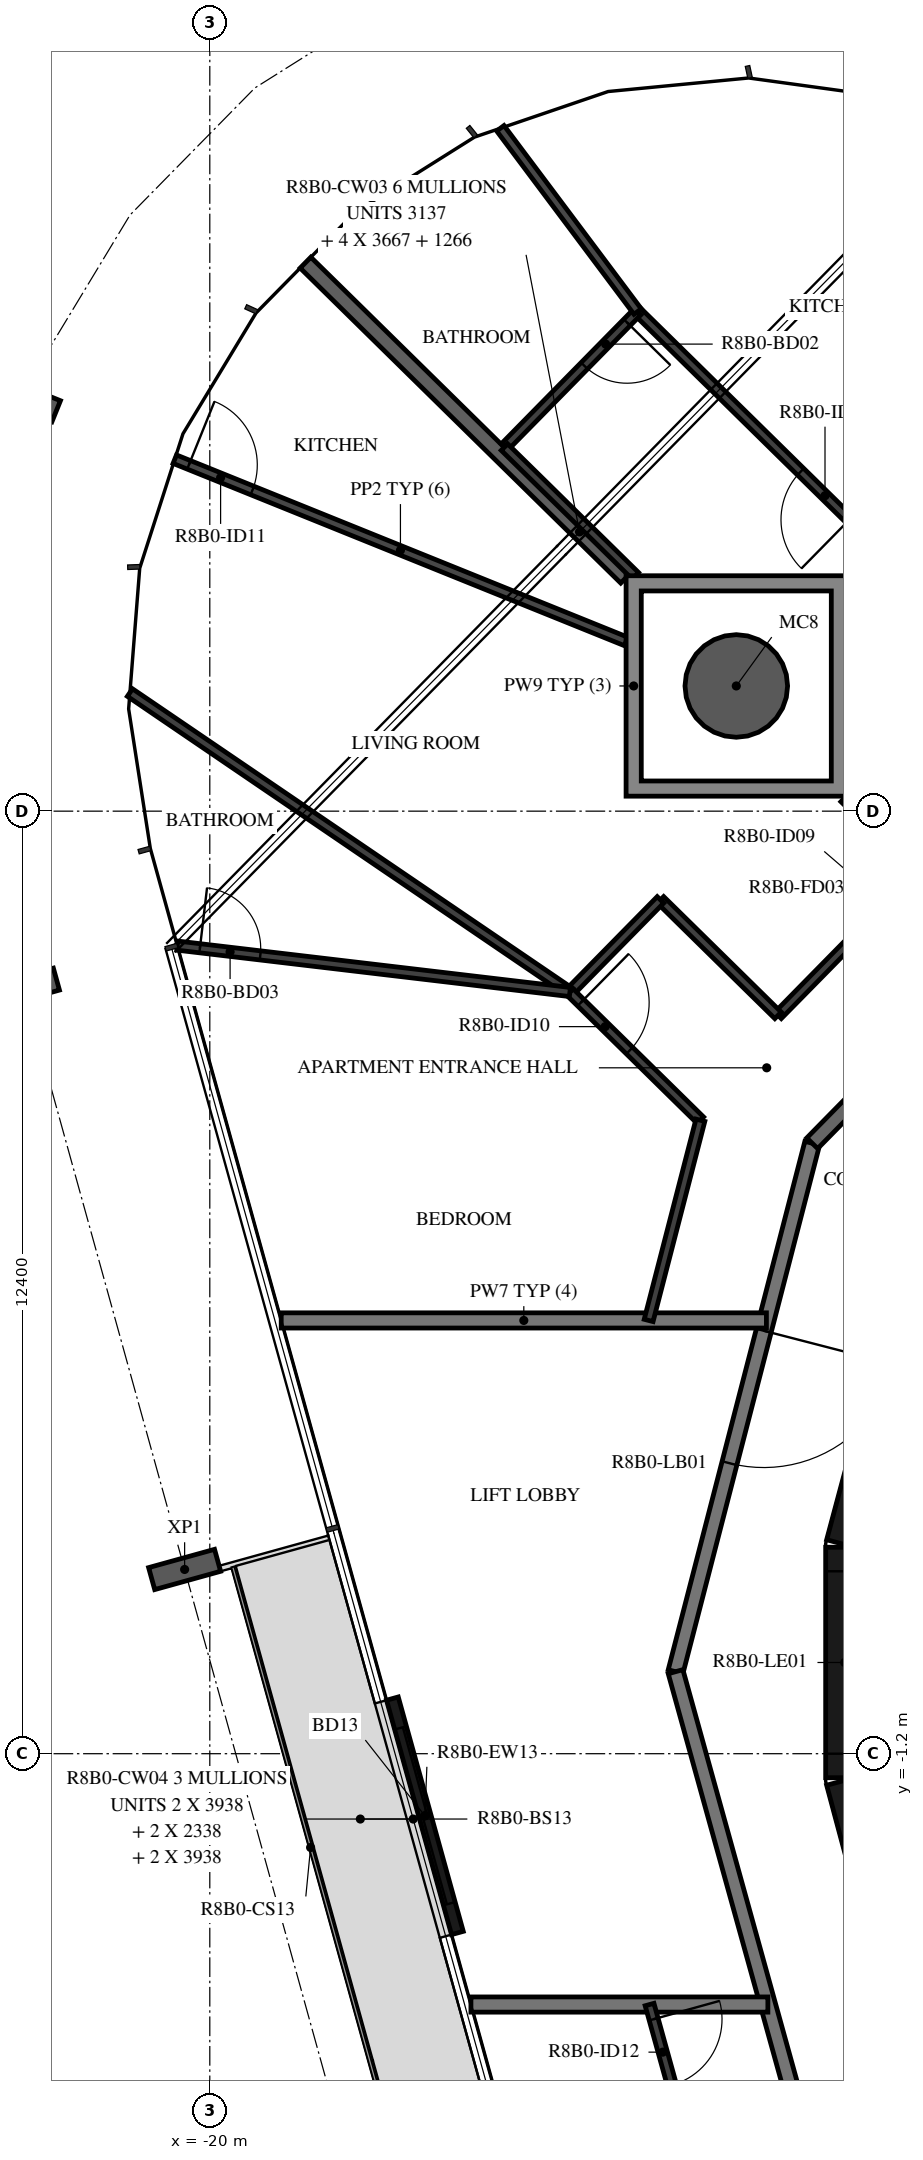
"""IFC4 building model, lengths in metres.
Left out: names, types, materials, properties, quantities, classifications, styles, units other than length and angle.
Written with IfcOpenShell. Run it as: python <this file> out.ifc"""

import sys

from ifc_helpers import new_model, si_unit, direction, frame, frame_2d, origin, origin_2d, place, context, subcontext, project, spatial, polyline, rectangle, hollow_circle, i_section, outline, extrude, element, fill, save


model = new_model("IFC4")
c1 = context("Model", 3, precision=1e-05, world=origin(), true_north=direction((0.0, 1.0)))
c2 = subcontext(c1, "Body", "Model", "MODEL_VIEW")
j1 = project(units=[si_unit("LENGTHUNIT", "METRE"), si_unit("PLANEANGLEUNIT", "RADIAN")], contexts=[c1])
p1 = place(None, origin())
s1 = spatial("IfcSite", under=j1, at=p1, CompositionType="ELEMENT")
p2 = place(p1, origin())
s2 = spatial("IfcBuilding", under=s1, at=p2, CompositionType="ELEMENT")
p3 = place(p2, frame((0.0, 0.0, 312.2)))
s3 = spatial("IfcBuildingStorey", under=s2, at=p3, CompositionType="ELEMENT", Elevation=312.2)
p4 = place(p3, frame((-13.073, 12.847, -0.38), z_axis=(0.0, 0.0, 1.0), x_axis=(1.0, 0.0, 0.0)))
e1 = element("IfcColumn", 1, at=p4, inside=s3, PredefinedType="COLUMN", context=c2, shape_type="SweptSolid", body=[
    extrude(hollow_circle(Radius=0.675, WallThickness=0.03, at=origin_2d()), origin(), (0.0, 0.0, 1.0), 3.5),
])
for number, where, z_axis, x_axis in (
    (2, (-22.438, 16.629, -0.38), (0.0, 0.0, 1.0), (0.374, 0.927, 0.0)),
    (3, (-22.452, 8.87, -0.38), (0.0, 0.0, 1.0), (-0.267, 0.964, 0.0)),
    (4, (-20.331, 1.224, -0.38), (0.0, 0.0, 1.0), (-0.267, 0.964, 0.0)),
):
    element("IfcColumn", number, at=place(p3, frame(where, z_axis=z_axis, x_axis=x_axis)), inside=s3, PredefinedType="COLUMN", context=c2, shape_type="SweptSolid", body=[
        extrude(i_section(OverallWidth=0.3, OverallDepth=0.9, WebThickness=0.019, FlangeThickness=0.035, FilletRadius=0.03, at=origin_2d()), origin(), (0.0, 0.0, 1.0), 3.5),
    ])
p5 = place(p3, frame((-17.598, -0.475, 0.0), z_axis=(0.0, 0.0, 1.0), x_axis=(0.267266077957, -0.963622770369, 0.0)))
e5 = element("IfcWall", 5, at=p5, inside=s3, PredefinedType="STANDARD", context=c2, shape_type="SweptSolid", body=[
    extrude(rectangle(XDim=3.2, YDim=0.16, at=frame_2d((1.6, 0.0))), origin(), (0.0, 0.0, 1.0), 3.12),
])
p6 = place(p5, frame((0.4, 0.0, 0.0)))
e6 = element("IfcOpeningElement", 6, at=p6, cuts=e5, PredefinedType="OPENING", context=c2, shape_type="SweptSolid", body=[
    extrude(rectangle(XDim=2.4, YDim=2.4, at=frame_2d((1.2, 1.2))), frame((0.0, 0.09, 0.0), z_axis=(0.0, -1.0, 0.0), x_axis=(1.0, 0.0, 0.0)), (0.0, 0.0, 1.0), 0.18),
])
p7 = place(p3, frame((-10.858, 4.479, 0.0), z_axis=(0.0, 0.0, 1.0), x_axis=(-0.258734743916, -0.965948410781, 0.0)))
e7 = element("IfcWall", 7, at=p7, inside=s3, PredefinedType="SHEAR", context=c2, shape_type="SweptSolid", body=[
    extrude(rectangle(XDim=3.033, YDim=0.5, at=frame_2d((1.516, 0.0))), origin(), (0.0, 0.0, 1.0), 3.12),
])
p8 = place(p3, frame((-11.647, 1.516, 0.0), z_axis=(0.0, 0.0, 1.0), x_axis=(0.0, -1.0, 0.0)))
e8 = element("IfcWall", 8, at=p8, inside=s3, PredefinedType="SHEAR", context=c2, shape_type="SweptSolid", body=[
    extrude(rectangle(XDim=3.033, YDim=0.5, at=frame_2d((1.516, 0.0))), origin(), (0.0, 0.0, 1.0), 3.12),
])
p9 = place(p8, frame((0.316, 0.0, 0.0)))
e9 = element("IfcOpeningElement", 9, at=p9, cuts=e8, PredefinedType="OPENING", context=c2, shape_type="SweptSolid", body=[
    extrude(rectangle(XDim=2.4, YDim=2.1, at=frame_2d((1.2, 1.05))), frame((0.0, 0.26, 0.0), z_axis=(0.0, -1.0, 0.0), x_axis=(1.0, 0.0, 0.0)), (0.0, 0.0, 1.0), 0.52),
])
p10 = place(p3, frame((-11.643, -1.55, 0.0), z_axis=(0.0, 0.0, 1.0), x_axis=(0.258734743916, -0.965948410781, 0.0)))
e10 = element("IfcWall", 10, at=p10, inside=s3, PredefinedType="SHEAR", context=c2, shape_type="SweptSolid", body=[
    extrude(rectangle(XDim=3.033, YDim=0.5, at=frame_2d((1.516, 0.0))), origin(), (0.0, 0.0, 1.0), 3.12),
])
p11 = place(p10, frame((1.066, 0.0, 0.0)))
e11 = element("IfcOpeningElement", 11, at=p11, cuts=e10, PredefinedType="OPENING", context=c2, shape_type="SweptSolid", body=[
    extrude(rectangle(XDim=0.9, YDim=2.1, at=frame_2d((0.45, 1.05))), frame((0.0, 0.26, 0.0), z_axis=(0.0, -1.0, 0.0), x_axis=(1.0, 0.0, 0.0)), (0.0, 0.0, 1.0), 0.52),
])
p12 = place(p3, frame((-12.074, 6.831, 0.0), z_axis=(0.0, 0.0, 1.0), x_axis=(-0.250391063186, -0.968144780225, 0.0)))
e12 = element("IfcWall", 12, at=p12, inside=s3, PredefinedType="STANDARD", context=c2, shape_type="SweptSolid", body=[
    extrude(rectangle(XDim=7.181, YDim=0.2, at=frame_2d((3.591, 0.0))), origin(), (0.0, 0.0, 1.0), 3.12),
])
p13 = place(p12, frame((2.548, 0.0, 0.0)))
e13 = element("IfcOpeningElement", 13, at=p13, cuts=e12, PredefinedType="OPENING", context=c2, shape_type="SweptSolid", body=[
    extrude(rectangle(XDim=1.8, YDim=2.1, at=frame_2d((0.9, 1.05))), frame((0.0, 0.11, 0.0), z_axis=(0.0, -1.0, 0.0), x_axis=(1.0, 0.0, 0.0)), (0.0, 0.0, 1.0), 0.22),
])
p14 = place(p3, frame((-13.872, -0.121, 0.0), z_axis=(0.0, 0.0, 1.0), x_axis=(0.267254575108, -0.963625960674, 0.0)))
e14 = element("IfcWall", 14, at=p14, inside=s3, PredefinedType="STANDARD", context=c2, shape_type="SweptSolid", body=[
    extrude(rectangle(XDim=7.181, YDim=0.2, at=frame_2d((3.591, 0.0))), origin(), (0.0, 0.0, 1.0), 3.12),
])
p15 = place(p3, frame((-7.041, 11.953, 0.0), z_axis=(0.0, 0.0, 1.0), x_axis=(-0.70090916255, -0.713250549143, 0.0)))
e15 = element("IfcWall", 15, at=p15, inside=s3, PredefinedType="STANDARD", context=c2, shape_type="SweptSolid", body=[
    extrude(rectangle(XDim=7.181, YDim=0.2, at=frame_2d((3.59, 0.0))), origin(), (0.0, 0.0, 1.0), 3.12),
])
p16 = place(p15, frame((3.791, 0.0, 0.0)))
e16 = element("IfcOpeningElement", 16, at=p16, cuts=e15, PredefinedType="OPENING", context=c2, shape_type="SweptSolid", body=[
    extrude(rectangle(XDim=1.0, YDim=2.1, at=frame_2d((0.5, 1.05))), frame((0.0, 0.11, 0.0), z_axis=(0.0, -1.0, 0.0), x_axis=(1.0, 0.0, 0.0)), (0.0, 0.0, 1.0), 0.22),
])
p17 = place(p3, frame((-12.677, 4.5, 0.0), z_axis=(0.0, 0.0, 1.0), x_axis=(-1.0, 0.0, 0.0)))
e17 = element("IfcWall", 17, at=p17, inside=s3, PredefinedType="STANDARD", context=c2, shape_type="SweptSolid", body=[
    extrude(rectangle(XDim=6.383, YDim=0.2, at=frame_2d((3.192, 0.0))), origin(), (0.0, 0.0, 1.0), 3.12),
])
p18 = place(p3, frame((-16.564, -4.5, 0.0), z_axis=(0.0, 0.0, 1.0), x_axis=(1.0, 0.0, 0.0)))
e18 = element("IfcWall", 18, at=p18, inside=s3, PredefinedType="STANDARD", context=c2, shape_type="SweptSolid", body=[
    extrude(rectangle(XDim=3.907, YDim=0.2, at=frame_2d((1.953, 0.0))), origin(), (0.0, 0.0, 1.0), 3.12),
])
p19 = place(p3, frame((-11.627, 11.396, 0.0), z_axis=(0.0, 0.0, 1.0), x_axis=(0.718328882961, -0.695703683981, 0.0)))
e19 = element("IfcWall", 19, at=p19, inside=s3, PredefinedType="STANDARD", context=c2, shape_type="SweptSolid", body=[
    extrude(rectangle(XDim=2.881, YDim=0.2, at=frame_2d((1.44, 0.0))), origin(), (0.0, 0.0, 1.0), 3.12),
])
p20 = place(p3, frame((-18.741, 18.417, 0.0), z_axis=(0.0, 0.0, 1.0), x_axis=(0.713252414586, -0.700907264256, 0.0)))
e20 = element("IfcWall", 20, at=p20, inside=s3, PredefinedType="STANDARD", context=c2, shape_type="SweptSolid", body=[
    extrude(rectangle(XDim=5.913, YDim=0.2, at=frame_2d((2.957, 0.0))), origin(), (0.0, 0.0, 1.0), 3.12),
])
p21 = place(p3, frame((-8.803, 12.3, 0.0), z_axis=(0.0, 0.0, 1.0), x_axis=(-0.713240430861, 0.700919458844, 0.0)))
e21 = element("IfcWall", 21, at=p21, inside=s3, PredefinedType="PARTITIONING", context=c2, shape_type="SweptSolid", body=[
    extrude(rectangle(XDim=7.807, YDim=0.12, at=frame_2d((3.904, 0.0))), origin(), (0.0, 0.0, 1.0), 3.12),
])
p22 = place(p21, frame((3.901, 0.0, 0.0)))
e22 = element("IfcOpeningElement", 22, at=p22, cuts=e21, PredefinedType="OPENING", context=c2, shape_type="SweptSolid", body=[
    extrude(rectangle(XDim=0.9, YDim=2.1, at=frame_2d((0.45, 1.05))), frame((0.0, 0.07, 0.0), z_axis=(0.0, -1.0, 0.0), x_axis=(1.0, 0.0, 0.0)), (0.0, 0.0, 1.0), 0.14),
])
p23 = place(p3, frame((-14.371, 17.772, 0.0), z_axis=(0.0, 0.0, 1.0), x_axis=(-0.700928101034, -0.713231937859, 0.0)))
e23 = element("IfcWall", 23, at=p23, inside=s3, PredefinedType="PARTITIONING", context=c2, shape_type="SweptSolid", body=[
    extrude(rectangle(XDim=2.5, YDim=0.12, at=frame_2d((1.25, 0.0))), origin(), (0.0, 0.0, 1.0), 3.12),
])
p24 = place(p23, frame((0.2, 0.0, 0.0)))
e24 = element("IfcOpeningElement", 24, at=p24, cuts=e23, PredefinedType="OPENING", context=c2, shape_type="SweptSolid", body=[
    extrude(rectangle(XDim=0.8, YDim=2.1, at=frame_2d((0.4, 1.05))), frame((0.0, 0.07, 0.0), z_axis=(0.0, -1.0, 0.0), x_axis=(1.0, 0.0, 0.0)), (0.0, 0.0, 1.0), 0.14),
])
p25 = place(p3, frame((-16.124, 15.989, 0.0), z_axis=(0.0, 0.0, 1.0), x_axis=(0.713298294795, -0.700860572898, 0.0)))
e25 = element("IfcWall", 25, at=p25, inside=s3, PredefinedType="PARTITIONING", context=c2, shape_type="SweptSolid", body=[
    extrude(rectangle(XDim=2.414, YDim=0.12, at=frame_2d((1.207, 0.0))), origin(), (0.0, 0.0, 1.0), 3.12),
])
p26 = place(p3, frame((-16.177, 20.184, 0.0), z_axis=(0.0, 0.0, 1.0), x_axis=(0.599546131574, -0.800340200237, 0.0)))
e26 = element("IfcWall", 26, at=p26, inside=s3, PredefinedType="PARTITIONING", context=c2, shape_type="SweptSolid", body=[
    extrude(rectangle(XDim=3.013, YDim=0.12, at=frame_2d((1.506, 0.0))), origin(), (0.0, 0.0, 1.0), 2.73),
])
p27 = place(p3, frame((-10.642, 10.429, 0.0), z_axis=(0.0, 0.0, 1.0), x_axis=(-0.700897237058, -0.713262268092, 0.0)))
e27 = element("IfcWall", 27, at=p27, inside=s3, PredefinedType="PARTITIONING", context=c2, shape_type="SweptSolid", body=[
    extrude(rectangle(XDim=2.685, YDim=0.12, at=frame_2d((1.343, 0.0))), origin(), (0.0, 0.0, 1.0), 3.12),
])
p28 = place(p27, frame((0.2, 0.0, 0.0)))
e28 = element("IfcOpeningElement", 28, at=p28, cuts=e27, PredefinedType="OPENING", context=c2, shape_type="SweptSolid", body=[
    extrude(rectangle(XDim=0.9, YDim=2.1, at=frame_2d((0.45, 1.05))), frame((0.0, 0.07, 0.0), z_axis=(0.0, -1.0, 0.0), x_axis=(1.0, 0.0, 0.0)), (0.0, 0.0, 1.0), 0.14),
])
p29 = place(p3, frame((-12.524, 8.513, 0.0), z_axis=(0.0, 0.0, 1.0), x_axis=(-0.713272241211, 0.700887087852, 0.0)))
e29 = element("IfcWall", 29, at=p29, inside=s3, PredefinedType="PARTITIONING", context=c2, shape_type="SweptSolid", body=[
    extrude(rectangle(XDim=2.168, YDim=0.12, at=frame_2d((1.084, 0.0))), origin(), (0.0, 0.0, 1.0), 3.12),
])
p30 = place(p3, frame((-14.071, 10.033, 0.0), z_axis=(0.0, 0.0, 1.0), x_axis=(-0.700903812832, -0.713255806255, 0.0)))
e30 = element("IfcWall", 30, at=p30, inside=s3, PredefinedType="PARTITIONING", context=c2, shape_type="SweptSolid", body=[
    extrude(rectangle(XDim=1.7, YDim=0.12, at=frame_2d((0.85, 0.0))), origin(), (0.0, 0.0, 1.0), 3.12),
])
p31 = place(p3, frame((-15.262, 8.821, 0.0), z_axis=(0.0, 0.0, 1.0), x_axis=(0.713216332019, -0.700943980459, 0.0)))
e31 = element("IfcWall", 31, at=p31, inside=s3, PredefinedType="PARTITIONING", context=c2, shape_type="SweptSolid", body=[
    extrude(rectangle(XDim=2.407, YDim=0.12, at=frame_2d((1.204, 0.0))), origin(), (0.0, 0.0, 1.0), 3.12),
])
p32 = place(p31, frame((0.2, 0.0, 0.0)))
e32 = element("IfcOpeningElement", 32, at=p32, cuts=e31, PredefinedType="OPENING", context=c2, shape_type="SweptSolid", body=[
    extrude(rectangle(XDim=0.9, YDim=2.1, at=frame_2d((0.45, 1.05))), frame((0.0, 0.07, 0.0), z_axis=(0.0, -1.0, 0.0), x_axis=(1.0, 0.0, 0.0)), (0.0, 0.0, 1.0), 0.14),
])
p33 = place(p3, frame((-13.545, 7.134, 0.0), z_axis=(0.0, 0.0, 1.0), x_axis=(-0.250320452157, -0.968163039592, 0.0)))
e33 = element("IfcWall", 33, at=p33, inside=s3, PredefinedType="PARTITIONING", context=c2, shape_type="SweptSolid", body=[
    extrude(rectangle(XDim=2.72, YDim=0.12, at=frame_2d((1.36, 0.0))), origin(), (0.0, 0.0, 1.0), 3.12),
])
p34 = place(p3, frame((-20.46, 15.831, 0.0), z_axis=(0.0, 0.0, 1.0), x_axis=(0.927230380144, -0.374491417977, 0.0)))
e34 = element("IfcWall", 34, at=p34, inside=s3, PredefinedType="PARTITIONING", context=c2, shape_type="SweptSolid", body=[
    extrude(rectangle(XDim=6.403, YDim=0.12, at=frame_2d((3.202, 0.0))), origin(), (0.0, 0.0, 1.0), 2.73),
])
p35 = place(p34, frame((0.2, 0.0, 0.0)))
e35 = element("IfcOpeningElement", 35, at=p35, cuts=e34, PredefinedType="OPENING", context=c2, shape_type="SweptSolid", body=[
    extrude(rectangle(XDim=0.9, YDim=2.1, at=frame_2d((0.45, 1.05))), frame((0.0, 0.07, 0.0), z_axis=(0.0, -1.0, 0.0), x_axis=(1.0, 0.0, 0.0)), (0.0, 0.0, 1.0), 0.14),
])
p36 = place(p3, frame((-21.051, 12.76, 0.0), z_axis=(0.0, 0.0, 1.0), x_axis=(0.826728647395, -0.562600874134, 0.0)))
e36 = element("IfcWall", 36, at=p36, inside=s3, PredefinedType="PARTITIONING", context=c2, shape_type="SweptSolid", body=[
    extrude(rectangle(XDim=7.002, YDim=0.12, at=frame_2d((3.501, 0.0))), origin(), (0.0, 0.0, 1.0), 3.12),
])
p37 = place(p3, frame((-20.428, 9.431, 0.0), z_axis=(0.0, 0.0, 1.0), x_axis=(0.993086702471, -0.117383139226, 0.0)))
e37 = element("IfcWall", 37, at=p37, inside=s3, PredefinedType="PARTITIONING", context=c2, shape_type="SweptSolid", body=[
    extrude(rectangle(XDim=5.202, YDim=0.12, at=frame_2d((2.601, 0.0))), origin(), (0.0, 0.0, 1.0), 3.12),
])
p38 = place(p37, frame((0.3, 0.0, 0.0)))
e38 = element("IfcOpeningElement", 38, at=p38, cuts=e37, PredefinedType="OPENING", context=c2, shape_type="SweptSolid", body=[
    extrude(rectangle(XDim=0.8, YDim=2.1, at=frame_2d((0.4, 1.05))), frame((0.0, 0.07, 0.0), z_axis=(0.0, -1.0, 0.0), x_axis=(1.0, 0.0, 0.0)), (0.0, 0.0, 1.0), 0.14),
])
p39 = place(p3, frame((-14.214, -4.5, 0.0), z_axis=(0.0, 0.0, 1.0), x_axis=(0.267199167841, -0.963641325756, 0.0)))
e39 = element("IfcWall", 39, at=p39, inside=s3, PredefinedType="PARTITIONING", context=c2, shape_type="SweptSolid", body=[
    extrude(rectangle(XDim=3.455, YDim=0.12, at=frame_2d((1.727, 0.0))), origin(), (0.0, 0.0, 1.0), 3.12),
])
p40 = place(p39, frame((0.2, 0.0, 0.0)))
e40 = element("IfcOpeningElement", 40, at=p40, cuts=e39, PredefinedType="OPENING", context=c2, shape_type="SweptSolid", body=[
    extrude(rectangle(XDim=0.9, YDim=2.1, at=frame_2d((0.45, 1.05))), frame((0.0, 0.07, 0.0), z_axis=(0.0, -1.0, 0.0), x_axis=(1.0, 0.0, 0.0)), (0.0, 0.0, 1.0), 0.14),
])
p41 = place(p3, origin())
e41 = element("IfcWall", 41, at=p41, inside=s3, PredefinedType="STANDARD", context=c2, shape_type="SweptSolid", body=[
    extrude(outline(polyline([(-11.623, 14.297), (-11.623, 11.397), (-14.523, 11.397), (-14.523, 14.297), (-11.623, 14.297)]), holes=[polyline([(-14.323, 11.597), (-11.823, 11.597), (-11.823, 14.097), (-14.323, 14.097), (-14.323, 11.597)])]), origin(), (0.0, 0.0, 1.0), 3.12),
])
p42 = place(p6, origin())
e42 = element("IfcDoor", 42, at=p42, inside=s3, OperationType="DOUBLE_DOOR_SLIDING", PredefinedType="DOOR", context=c2, shape_type="SweptSolid", body=[
    extrude(rectangle(XDim=2.4, YDim=2.4, at=frame_2d((1.2, 1.2))), frame((0.0, 0.025, 0.0), z_axis=(0.0, -1.0, 0.0), x_axis=(1.0, 0.0, 0.0)), (0.0, 0.0, 1.0), 0.05),
])
fill(e6, e42)
p43 = place(p9, origin())
e43 = element("IfcDoor", 43, at=p43, inside=s3, OperationType="DOUBLE_DOOR_SINGLE_SWING", PredefinedType="DOOR", context=c2, shape_type="SweptSolid", body=[
    extrude(rectangle(XDim=2.4, YDim=2.1, at=frame_2d((1.2, 1.05))), frame((0.0, 0.025, 0.0), z_axis=(0.0, -1.0, 0.0), x_axis=(1.0, 0.0, 0.0)), (0.0, 0.0, 1.0), 0.05),
])
fill(e9, e43)
p44 = place(p22, origin())
e44 = element("IfcDoor", 44, at=p44, inside=s3, OperationType="SINGLE_SWING_LEFT", PredefinedType="DOOR", context=c2, shape_type="SweptSolid", body=[
    extrude(rectangle(XDim=0.9, YDim=2.1, at=frame_2d((0.45, 1.05))), frame((0.0, 0.025, 0.0), z_axis=(0.0, -1.0, 0.0), x_axis=(1.0, 0.0, 0.0)), (0.0, 0.0, 1.0), 0.05),
])
fill(e22, e44)
p45 = place(p24, origin())
e45 = element("IfcDoor", 45, at=p45, inside=s3, OperationType="SINGLE_SWING_RIGHT", PredefinedType="DOOR", context=c2, shape_type="SweptSolid", body=[
    extrude(rectangle(XDim=0.8, YDim=2.1, at=frame_2d((0.4, 1.05))), frame((0.0, 0.025, 0.0), z_axis=(0.0, -1.0, 0.0), x_axis=(1.0, 0.0, 0.0)), (0.0, 0.0, 1.0), 0.05),
])
fill(e24, e45)
p46 = place(p32, origin())
e46 = element("IfcDoor", 46, at=p46, inside=s3, OperationType="SINGLE_SWING_LEFT", PredefinedType="DOOR", context=c2, shape_type="SweptSolid", body=[
    extrude(rectangle(XDim=0.9, YDim=2.1, at=frame_2d((0.45, 1.05))), frame((0.0, 0.025, 0.0), z_axis=(0.0, -1.0, 0.0), x_axis=(1.0, 0.0, 0.0)), (0.0, 0.0, 1.0), 0.05),
])
fill(e32, e46)
p47 = place(p35, origin())
e47 = element("IfcDoor", 47, at=p47, inside=s3, OperationType="SINGLE_SWING_LEFT", PredefinedType="DOOR", context=c2, shape_type="SweptSolid", body=[
    extrude(rectangle(XDim=0.9, YDim=2.1, at=frame_2d((0.45, 1.05))), frame((0.0, 0.025, 0.0), z_axis=(0.0, -1.0, 0.0), x_axis=(1.0, 0.0, 0.0)), (0.0, 0.0, 1.0), 0.05),
])
fill(e35, e47)
p48 = place(p38, origin())
e48 = element("IfcDoor", 48, at=p48, inside=s3, OperationType="SINGLE_SWING_LEFT", PredefinedType="DOOR", context=c2, shape_type="SweptSolid", body=[
    extrude(rectangle(XDim=0.8, YDim=2.1, at=frame_2d((0.4, 1.05))), frame((0.0, 0.025, 0.0), z_axis=(0.0, -1.0, 0.0), x_axis=(1.0, 0.0, 0.0)), (0.0, 0.0, 1.0), 0.05),
])
fill(e38, e48)
p49 = place(p40, origin())
e49 = element("IfcDoor", 49, at=p49, inside=s3, OperationType="SINGLE_SWING_RIGHT", PredefinedType="DOOR", context=c2, shape_type="SweptSolid", body=[
    extrude(rectangle(XDim=0.9, YDim=2.1, at=frame_2d((0.45, 1.05))), frame((0.0, 0.025, 0.0), z_axis=(0.0, -1.0, 0.0), x_axis=(1.0, 0.0, 0.0)), (0.0, 0.0, 1.0), 0.05),
])
fill(e40, e49)
p50 = place(p13, origin())
e50 = element("IfcDoor", 50, at=p50, inside=s3, OperationType="DOUBLE_DOOR_SINGLE_SWING", PredefinedType="DOOR", context=c2, shape_type="SweptSolid", body=[
    extrude(rectangle(XDim=1.8, YDim=2.1, at=frame_2d((0.9, 1.05))), frame((0.0, 0.025, 0.0), z_axis=(0.0, -1.0, 0.0), x_axis=(1.0, 0.0, 0.0)), (0.0, 0.0, 1.0), 0.05),
])
fill(e13, e50)
save(model, sys.argv[1])
